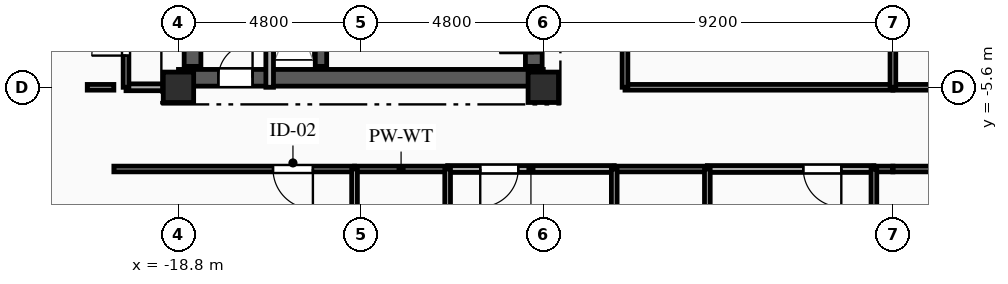
"""IFC4 building model, lengths in metres.
Left out: names, types, materials, properties, quantities, classifications, styles, units other than length and angle.
Written with IfcOpenShell. Run it as: python <this file> out.ifc"""

import sys

from ifc_helpers import new_model, si_unit, direction, frame, frame_2d, origin, origin_2d, place, context, subcontext, project, spatial, rectangle, extrude, element, fill, save


model = new_model("IFC4")
c1 = context("Model", 3, precision=1e-05, world=origin(), true_north=direction((0.0, 1.0)))
c2 = subcontext(c1, "Body", "Model", "MODEL_VIEW")
j1 = project(units=[si_unit("LENGTHUNIT", "METRE"), si_unit("PLANEANGLEUNIT", "RADIAN")], contexts=[c1])
p1 = place(None, origin())
s1 = spatial("IfcSite", under=j1, at=p1, CompositionType="ELEMENT")
p2 = place(p1, origin())
s2 = spatial("IfcBuilding", under=s1, at=p2, CompositionType="ELEMENT")
p3 = place(p2, frame((0.0, 0.0, 241.7)))
s3 = spatial("IfcBuildingStorey", under=s2, at=p3, CompositionType="ELEMENT", Elevation=241.7)
for number, where, z_axis, x_axis in (
    (1, (-18.8, -5.6, 0.0), (0.0, 0.0, 1.0), (1.0, 0.0, 0.0)),
    (2, (-9.2, -5.6, 0.0), (0.0, 0.0, 1.0), (1.0, 0.0, 0.0)),
):
    element("IfcColumn", number, at=place(p3, frame(where, z_axis=z_axis, x_axis=x_axis)), inside=s3, PredefinedType="COLUMN", context=c2, shape_type="SweptSolid", body=[
        extrude(rectangle(XDim=0.8, YDim=0.8, at=origin_2d()), origin(), (0.0, 0.0, 1.0), 3.35),
    ])
p4 = place(p3, frame((-18.8, -5.35, 0.0), z_axis=(0.0, 0.0, 1.0), x_axis=(1.0, 0.0, 0.0)))
e3 = element("IfcWall", 3, at=p4, inside=s3, PredefinedType="SHEAR", context=c2, shape_type="SweptSolid", body=[
    extrude(rectangle(XDim=9.6, YDim=0.44, at=frame_2d((4.8, 0.0))), origin(), (0.0, 0.0, 1.0), 3.04),
])
p5 = place(p4, frame((1.05, 0.0, 0.0)))
e4 = element("IfcOpeningElement", 4, at=p5, cuts=e3, PredefinedType="OPENING", context=c2, shape_type="SweptSolid", body=[
    extrude(rectangle(XDim=0.9, YDim=2.1, at=frame_2d((0.45, 1.05))), frame((0.0, 0.23, 0.0), z_axis=(0.0, -1.0, 0.0), x_axis=(1.0, 0.0, 0.0)), (0.0, 0.0, 1.0), 0.46),
])
p6 = place(p3, frame((-18.43, -5.05, 0.0), z_axis=(0.0, 0.0, 1.0), x_axis=(0.0, 1.0, 0.0)))
e5 = element("IfcWall", 5, at=p6, inside=s3, PredefinedType="SHEAR", context=c2, shape_type="SweptSolid", body=[
    extrude(rectangle(XDim=10.1, YDim=0.44, at=frame_2d((5.05, 0.0))), origin(), (0.0, 0.0, 1.0), 3.04),
])
p7 = place(p3, frame((-9.45, -5.05, 0.0), z_axis=(0.0, 0.0, 1.0), x_axis=(0.0, 1.0, 0.0)))
e6 = element("IfcWall", 6, at=p7, inside=s3, PredefinedType="SHEAR", context=c2, shape_type="SweptSolid", body=[
    extrude(rectangle(XDim=10.1, YDim=0.44, at=frame_2d((5.05, 0.0))), origin(), (0.0, 0.0, 1.0), 3.04),
])
p8 = place(p7, frame((7.15, 0.0, 0.0)))
e7 = element("IfcOpeningElement", 7, at=p8, cuts=e6, PredefinedType="OPENING", context=c2, shape_type="SweptSolid", body=[
    extrude(rectangle(XDim=0.9, YDim=2.1, at=frame_2d((0.45, 1.05))), frame((0.0, 0.23, 0.0), z_axis=(0.0, -1.0, 0.0), x_axis=(1.0, 0.0, 0.0)), (0.0, 0.0, 1.0), 0.46),
])
p9 = place(p7, frame((2.4, 0.0, 0.0)))
e8 = element("IfcOpeningElement", 8, at=p9, cuts=e6, PredefinedType="OPENING", context=c2, shape_type="SweptSolid", body=[
    extrude(rectangle(XDim=1.2, YDim=2.15, at=frame_2d((0.6, 1.075))), frame((0.0, 0.23, 0.0), z_axis=(0.0, -1.0, 0.0), x_axis=(1.0, 0.0, 0.0)), (0.0, 0.0, 1.0), 0.46),
])
p10 = place(p7, frame((0.35, 0.0, 0.0)))
e9 = element("IfcOpeningElement", 9, at=p10, cuts=e6, PredefinedType="OPENING", context=c2, shape_type="SweptSolid", body=[
    extrude(rectangle(XDim=0.9, YDim=2.1, at=frame_2d((0.45, 1.05))), frame((0.0, 0.23, 0.0), z_axis=(0.0, -1.0, 0.0), x_axis=(1.0, 0.0, 0.0)), (0.0, 0.0, 1.0), 0.46),
])
p11 = place(p7, frame((5.0, 0.0, 0.0)))
e10 = element("IfcOpeningElement", 10, at=p11, cuts=e6, PredefinedType="OPENING", context=c2, shape_type="SweptSolid", body=[
    extrude(rectangle(XDim=0.9, YDim=2.1, at=frame_2d((0.45, 1.05))), frame((0.0, 0.23, 0.0), z_axis=(0.0, -1.0, 0.0), x_axis=(1.0, 0.0, 0.0)), (0.0, 0.0, 1.0), 0.46),
])
p12 = place(p3, frame((-15.05, -5.05, 0.0), z_axis=(0.0, 0.0, 1.0), x_axis=(0.0, 1.0, 0.0)))
e11 = element("IfcWall", 11, at=p12, inside=s3, PredefinedType="SHEAR", context=c2, shape_type="SweptSolid", body=[
    extrude(rectangle(XDim=10.1, YDim=0.3, at=frame_2d((5.05, 0.0))), origin(), (0.0, 0.0, 1.0), 3.04),
])
p13 = place(p3, frame((-16.4, -5.6, 0.0), z_axis=(0.0, 0.0, 1.0), x_axis=(0.0, 1.0, 0.0)))
e12 = element("IfcWall", 12, at=p13, inside=s3, PredefinedType="PARTITIONING", context=c2, shape_type="SweptSolid", body=[
    extrude(rectangle(XDim=3.49, YDim=0.2, at=frame_2d((1.745, 0.0))), origin(), (0.0, 0.0, 1.0), 3.04),
])
p14 = place(p3, frame((-20.18, -5.6, 0.0), z_axis=(0.0, 0.0, 1.0), x_axis=(1.0, 0.0, 0.0)))
e13 = element("IfcWall", 13, at=p14, inside=s3, PredefinedType="PARTITIONING", context=c2, shape_type="SweptSolid", body=[
    extrude(rectangle(XDim=1.38, YDim=0.18, at=frame_2d((0.69, 0.0))), origin(), (0.0, 0.0, 1.0), 3.04),
])
p15 = place(p3, frame((-21.2, -5.6, 0.0), z_axis=(0.0, 0.0, 1.0), x_axis=(1.0, 0.0, 0.0)))
e14 = element("IfcWall", 14, at=p15, inside=s3, PredefinedType="PLUMBINGWALL", context=c2, shape_type="SweptSolid", body=[
    extrude(rectangle(XDim=0.7, YDim=0.15, at=frame_2d((0.35, 0.0))), origin(), (0.0, 0.0, 1.0), 3.04),
])
p16 = place(p3, frame((-14.167, -7.75, 0.0), z_axis=(0.0, 0.0, 1.0), x_axis=(-1.0, 0.0, 0.0)))
e15 = element("IfcWall", 15, at=p16, inside=s3, PredefinedType="PARTITIONING", context=c2, shape_type="SweptSolid", body=[
    extrude(rectangle(XDim=6.333, YDim=0.15, at=frame_2d((3.167, 0.0))), origin(), (0.0, 0.0, 1.0), 3.04),
])
p17 = place(p16, frame((1.095, 0.0, 0.0)))
e16 = element("IfcOpeningElement", 16, at=p17, cuts=e15, PredefinedType="OPENING", context=c2, shape_type="SweptSolid", body=[
    extrude(rectangle(XDim=1.05, YDim=2.15, at=frame_2d((0.525, 1.075))), frame((0.0, 0.085, 0.0), z_axis=(0.0, -1.0, 0.0), x_axis=(1.0, 0.0, 0.0)), (0.0, 0.0, 1.0), 0.17),
])
p18 = place(p3, frame((-7.333, -7.75, 0.0), z_axis=(0.0, 0.0, 1.0), x_axis=(-1.0, 0.0, 0.0)))
e17 = element("IfcWall", 17, at=p18, inside=s3, PredefinedType="PARTITIONING", context=c2, shape_type="SweptSolid", body=[
    extrude(rectangle(XDim=4.384, YDim=0.18, at=frame_2d((2.192, 0.0))), origin(), (0.0, 0.0, 1.0), 3.04),
])
p19 = place(p18, frame((2.526, 0.0, 0.0)))
e18 = element("IfcOpeningElement", 18, at=p19, cuts=e17, PredefinedType="OPENING", context=c2, shape_type="SweptSolid", body=[
    extrude(rectangle(XDim=1.0, YDim=2.15, at=frame_2d((0.5, 1.075))), frame((0.0, 0.1, 0.0), z_axis=(0.0, -1.0, 0.0), x_axis=(1.0, 0.0, 0.0)), (0.0, 0.0, 1.0), 0.2),
])
p20 = place(p3, frame((-11.717, -7.75, 0.0), z_axis=(0.0, 0.0, 1.0), x_axis=(-1.0, 0.0, 0.0)))
e19 = element("IfcWall", 19, at=p20, inside=s3, PredefinedType="PLUMBINGWALL", context=c2, shape_type="SweptSolid", body=[
    extrude(rectangle(XDim=2.45, YDim=0.15, at=frame_2d((1.225, 0.0))), origin(), (0.0, 0.0, 1.0), 3.04),
])
p21 = place(p3, frame((-0.5, -7.75, 0.0), z_axis=(0.0, 0.0, 1.0), x_axis=(-1.0, 0.0, 0.0)))
e20 = element("IfcWall", 20, at=p21, inside=s3, PredefinedType="PARTITIONING", context=c2, shape_type="SweptSolid", body=[
    extrude(rectangle(XDim=4.383, YDim=0.18, at=frame_2d((2.191, 0.0))), origin(), (0.0, 0.0, 1.0), 3.04),
])
p22 = place(p21, frame((0.858, 0.0, 0.0)))
e21 = element("IfcOpeningElement", 21, at=p22, cuts=e20, PredefinedType="OPENING", context=c2, shape_type="SweptSolid", body=[
    extrude(rectangle(XDim=1.0, YDim=2.15, at=frame_2d((0.5, 1.075))), frame((0.0, 0.1, 0.0), z_axis=(0.0, -1.0, 0.0), x_axis=(1.0, 0.0, 0.0)), (0.0, 0.0, 1.0), 0.2),
])
p23 = place(p3, frame((-4.883, -7.75, 0.0), z_axis=(0.0, 0.0, 1.0), x_axis=(-1.0, 0.0, 0.0)))
e22 = element("IfcWall", 22, at=p23, inside=s3, PredefinedType="PLUMBINGWALL", context=c2, shape_type="SweptSolid", body=[
    extrude(rectangle(XDim=2.45, YDim=0.15, at=frame_2d((1.225, 0.0))), origin(), (0.0, 0.0, 1.0), 3.04),
])
p24 = place(p3, frame((0.0, -7.75, 0.0), z_axis=(0.0, 0.0, 1.0), x_axis=(-1.0, 0.0, 0.0)))
e23 = element("IfcWall", 23, at=p24, inside=s3, PredefinedType="PLUMBINGWALL", context=c2, shape_type="SweptSolid", body=[
    extrude(rectangle(XDim=0.5, YDim=0.15, at=frame_2d((0.25, 0.0))), origin(), (0.0, 0.0, 1.0), 3.04),
])
p25 = place(p3, frame((-7.05, -5.6, 0.0), z_axis=(0.0, 0.0, 1.0), x_axis=(1.0, 0.0, 0.0)))
e24 = element("IfcWall", 24, at=p25, inside=s3, PredefinedType="PARTITIONING", context=c2, shape_type="SweptSolid", body=[
    extrude(rectangle(XDim=7.05, YDim=0.15, at=frame_2d((3.525, 0.0))), origin(), (0.0, 0.0, 1.0), 2.525),
])
p26 = place(p3, frame((1.95, -7.75, 0.0), z_axis=(0.0, 0.0, 1.0), x_axis=(-1.0, 0.0, 0.0)))
e25 = element("IfcWall", 25, at=p26, inside=s3, PredefinedType="PLUMBINGWALL", context=c2, shape_type="SweptSolid", body=[
    extrude(rectangle(XDim=1.95, YDim=0.15, at=frame_2d((0.975, 0.0))), origin(), (0.0, 0.0, 1.0), 3.04),
])
p27 = place(p3, frame((0.0, -5.6, 0.0), z_axis=(0.0, 0.0, 1.0), x_axis=(1.0, 0.0, 0.0)))
e26 = element("IfcWall", 26, at=p27, inside=s3, PredefinedType="PARTITIONING", context=c2, shape_type="SweptSolid", body=[
    extrude(rectangle(XDim=7.05, YDim=0.15, at=frame_2d((3.525, 0.0))), origin(), (0.0, 0.0, 1.0), 2.525),
])
p28 = place(p27, frame((1.185, 0.0, 0.0)))
e27 = element("IfcOpeningElement", 27, at=p28, cuts=e26, PredefinedType="OPENING", context=c2, shape_type="SweptSolid", body=[
    extrude(rectangle(XDim=1.05, YDim=2.15, at=frame_2d((0.525, 1.075))), frame((0.0, 0.085, 0.0), z_axis=(0.0, -1.0, 0.0), x_axis=(1.0, 0.0, 0.0)), (0.0, 0.0, 1.0), 0.17),
])
p29 = place(p3, frame((-7.05, 8.5, 0.0), z_axis=(0.0, 0.0, 1.0), x_axis=(0.0, -1.0, 0.0)))
e28 = element("IfcWall", 28, at=p29, inside=s3, PredefinedType="PARTITIONING", context=c2, shape_type="SweptSolid", body=[
    extrude(rectangle(XDim=14.1, YDim=0.15, at=frame_2d((7.05, 0.0))), origin(), (0.0, 0.0, 1.0), 3.04),
])
p30 = place(p29, frame((8.011, 0.0, 0.0)))
e29 = element("IfcOpeningElement", 29, at=p30, cuts=e28, PredefinedType="OPENING", context=c2, shape_type="SweptSolid", body=[
    extrude(rectangle(XDim=1.05, YDim=2.15, at=frame_2d((0.525, 1.075))), frame((0.0, 0.085, 0.0), z_axis=(0.0, -1.0, 0.0), x_axis=(1.0, 0.0, 0.0)), (0.0, 0.0, 1.0), 0.17),
])
p31 = place(p3, frame((-20.18, -5.6, 0.0), z_axis=(0.0, 0.0, 1.0), x_axis=(0.0, 1.0, 0.0)))
e30 = element("IfcWall", 30, at=p31, inside=s3, PredefinedType="PLUMBINGWALL", context=c2, shape_type="SweptSolid", body=[
    extrude(rectangle(XDim=2.35, YDim=0.15, at=frame_2d((1.175, 0.0))), origin(), (0.0, 0.0, 1.0), 3.04),
])
p32 = place(p31, frame((0.834, 0.0, 0.0)))
e31 = element("IfcOpeningElement", 31, at=p32, cuts=e30, PredefinedType="OPENING", context=c2, shape_type="SweptSolid", body=[
    extrude(rectangle(XDim=0.9, YDim=2.1, at=frame_2d((0.45, 1.05))), frame((0.0, 0.085, 0.0), z_axis=(0.0, -1.0, 0.0), x_axis=(1.0, 0.0, 0.0)), (0.0, 0.0, 1.0), 0.17),
])
for number, where, z_axis, x_axis in (
    (32, (-14.167, -7.75, 0.0), (0.0, 0.0, 1.0), (0.0, -1.0, 0.0)),
    (33, (-11.717, -9.9, 0.0), (0.0, 0.0, 1.0), (0.0, 1.0, 0.0)),
    (34, (-7.333, -7.75, 0.0), (0.0, 0.0, 1.0), (0.0, -1.0, 0.0)),
    (35, (-4.883, -9.9, 0.0), (0.0, 0.0, 1.0), (0.0, 1.0, 0.0)),
    (36, (-0.5, -7.75, 0.0), (0.0, 0.0, 1.0), (0.0, -1.0, 0.0)),
):
    element("IfcWall", number, at=place(p3, frame(where, z_axis=z_axis, x_axis=x_axis)), inside=s3, PredefinedType="PLUMBINGWALL", context=c2, shape_type="SweptSolid", body=[
        extrude(rectangle(XDim=2.15, YDim=0.15, at=frame_2d((1.075, 0.0))), origin(), (0.0, 0.0, 1.0), 3.04),
    ])
p33 = place(p3, frame((0.0, 1.45, 0.0), z_axis=(0.0, 0.0, 1.0), x_axis=(0.0, -1.0, 0.0)))
e37 = element("IfcWall", 37, at=p33, inside=s3, PredefinedType="PARTITIONING", context=c2, shape_type="SweptSolid", body=[
    extrude(rectangle(XDim=7.05, YDim=0.15, at=frame_2d((3.525, 0.0))), origin(), (0.0, 0.0, 1.0), 3.04),
])
p34 = place(p5, origin())
e38 = element("IfcDoor", 38, at=p34, inside=s3, OperationType="SINGLE_SWING_RIGHT", PredefinedType="DOOR", context=c2, shape_type="SweptSolid", body=[
    extrude(rectangle(XDim=0.9, YDim=2.1, at=frame_2d((0.45, 1.05))), frame((0.0, 0.025, 0.0), z_axis=(0.0, -1.0, 0.0), x_axis=(1.0, 0.0, 0.0)), (0.0, 0.0, 1.0), 0.05),
])
fill(e4, e38)
p35 = place(p10, origin())
e39 = element("IfcDoor", 39, at=p35, inside=s3, OperationType="SINGLE_SWING_LEFT", PredefinedType="DOOR", context=c2, shape_type="SweptSolid", body=[
    extrude(rectangle(XDim=0.9, YDim=2.1, at=frame_2d((0.45, 1.05))), frame((0.0, 0.025, 0.0), z_axis=(0.0, -1.0, 0.0), x_axis=(1.0, 0.0, 0.0)), (0.0, 0.0, 1.0), 0.05),
])
fill(e9, e39)
p36 = place(p17, origin())
e40 = element("IfcDoor", 40, at=p36, inside=s3, OperationType="SINGLE_SWING_LEFT", PredefinedType="DOOR", context=c2, shape_type="SweptSolid", body=[
    extrude(rectangle(XDim=1.05, YDim=2.15, at=frame_2d((0.525, 1.075))), frame((0.0, 0.025, 0.0), z_axis=(0.0, -1.0, 0.0), x_axis=(1.0, 0.0, 0.0)), (0.0, 0.0, 1.0), 0.05),
])
fill(e16, e40)
p37 = place(p19, origin())
e41 = element("IfcDoor", 41, at=p37, inside=s3, OperationType="SINGLE_SWING_RIGHT", PredefinedType="DOOR", context=c2, shape_type="SweptSolid", body=[
    extrude(rectangle(XDim=1.0, YDim=2.15, at=frame_2d((0.5, 1.075))), frame((0.0, 0.025, 0.0), z_axis=(0.0, -1.0, 0.0), x_axis=(1.0, 0.0, 0.0)), (0.0, 0.0, 1.0), 0.05),
])
fill(e18, e41)
p38 = place(p22, origin())
e42 = element("IfcDoor", 42, at=p38, inside=s3, OperationType="SINGLE_SWING_LEFT", PredefinedType="DOOR", context=c2, shape_type="SweptSolid", body=[
    extrude(rectangle(XDim=1.0, YDim=2.15, at=frame_2d((0.5, 1.075))), frame((0.0, 0.025, 0.0), z_axis=(0.0, -1.0, 0.0), x_axis=(1.0, 0.0, 0.0)), (0.0, 0.0, 1.0), 0.05),
])
fill(e21, e42)
p39 = place(p32, origin())
e43 = element("IfcDoor", 43, at=p39, inside=s3, OperationType="SINGLE_SWING_LEFT", PredefinedType="DOOR", context=c2, shape_type="SweptSolid", body=[
    extrude(rectangle(XDim=0.9, YDim=2.1, at=frame_2d((0.45, 1.05))), frame((0.0, 0.025, 0.0), z_axis=(0.0, -1.0, 0.0), x_axis=(1.0, 0.0, 0.0)), (0.0, 0.0, 1.0), 0.05),
])
fill(e31, e43)
save(model, sys.argv[1])
